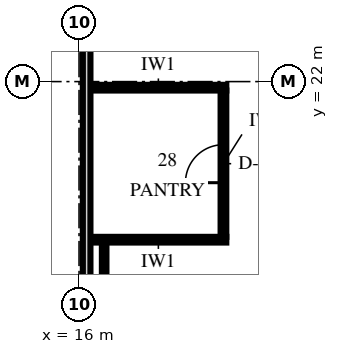
"""IFC4 building model, lengths in metres.
Left out: names, types, materials, properties, quantities, classifications, styles, units other than length and angle.
Written with IfcOpenShell. Run it as: python <this file> out.ifc"""

import sys

from ifc_helpers import new_model, si_unit, direction, frame, frame_2d, origin, place, context, subcontext, project, spatial, rectangle, extrude, element, fill, save


model = new_model("IFC4")
c1 = context("Model", 3, precision=1e-05, world=origin(), true_north=direction((0.0, 1.0)))
c2 = subcontext(c1, "Body", "Model", "MODEL_VIEW")
j1 = project(units=[si_unit("LENGTHUNIT", "METRE"), si_unit("PLANEANGLEUNIT", "RADIAN")], contexts=[c1])
p1 = place(None, origin())
s1 = spatial("IfcSite", under=j1, at=p1, CompositionType="ELEMENT")
p2 = place(p1, origin())
s2 = spatial("IfcBuilding", under=s1, at=p2, CompositionType="ELEMENT")
p3 = place(p2, frame((0.0, 0.0, 103.0)))
s3 = spatial("IfcBuildingStorey", under=s2, at=p3, CompositionType="ELEMENT", Elevation=103.0)
p4 = place(p3, frame((16.3, 17.84, 0.0), z_axis=(0.0, 0.0, 1.0), x_axis=(1.0, 0.0, 0.0)))
e1 = element("IfcWall", 1, at=p4, inside=s3, PredefinedType="PARTITIONING", context=c2, shape_type="SweptSolid", body=[
    extrude(rectangle(XDim=3.575, YDim=0.15, at=frame_2d((1.788, 0.0))), origin(), (0.0, 0.0, 1.0), 3.25),
])
p5 = place(p3, frame((16.3, 21.84, 0.0), z_axis=(0.0, 0.0, 1.0), x_axis=(1.0, 0.0, 0.0)))
e2 = element("IfcWall", 2, at=p5, inside=s3, PredefinedType="PARTITIONING", context=c2, shape_type="SweptSolid", body=[
    extrude(rectangle(XDim=3.575, YDim=0.15, at=frame_2d((1.788, 0.0))), origin(), (0.0, 0.0, 1.0), 3.4),
])
p6 = place(p3, frame((16.2, 3.9, 0.0), z_axis=(0.0, 0.0, 1.0), x_axis=(0.0, 1.0, 0.0)))
e3 = element("IfcWall", 3, at=p6, inside=s3, PredefinedType="PARTITIONING", context=c2, shape_type="SweptSolid", body=[
    extrude(rectangle(XDim=22.2, YDim=0.2, at=frame_2d((11.1, 0.0))), origin(), (0.0, 0.0, 1.0), 2.842),
])
p7 = place(p6, frame((4.5, 0.0, 0.0)))
e4 = element("IfcOpeningElement", 4, at=p7, cuts=e3, PredefinedType="OPENING", context=c2, shape_type="SweptSolid", body=[
    extrude(rectangle(XDim=1.2, YDim=2.4, at=frame_2d((0.6, 1.2))), frame((0.0, 0.115, 0.0), z_axis=(0.0, -1.0, 0.0), x_axis=(1.0, 0.0, 0.0)), (0.0, 0.0, 1.0), 0.23),
])
p8 = place(p3, frame((19.8, 17.915, 0.0), z_axis=(0.0, 0.0, 1.0), x_axis=(0.0, 1.0, 0.0)))
e5 = element("IfcWall", 5, at=p8, inside=s3, PredefinedType="PARTITIONING", context=c2, shape_type="SweptSolid", body=[
    extrude(rectangle(XDim=3.85, YDim=0.15, at=frame_2d((1.925, 0.0))), origin(), (0.0, 0.0, 1.0), 3.25),
])
p9 = place(p8, frame((1.425, 0.0, 0.0)))
e6 = element("IfcOpeningElement", 6, at=p9, cuts=e5, PredefinedType="OPENING", context=c2, shape_type="SweptSolid", body=[
    extrude(rectangle(XDim=1.0, YDim=2.3, at=frame_2d((0.5, 1.15))), frame((0.0, 0.09, 0.0), z_axis=(0.0, -1.0, 0.0), x_axis=(1.0, 0.0, 0.0)), (0.0, 0.0, 1.0), 0.18),
])
p10 = place(p3, frame((16.661, 9.9, 0.0), z_axis=(0.0, 0.0, 1.0), x_axis=(0.0, 1.0, 0.0)))
e7 = element("IfcWall", 7, at=p10, inside=s3, PredefinedType="PARTITIONING", context=c2, shape_type="SweptSolid", body=[
    extrude(rectangle(XDim=7.845, YDim=0.12, at=frame_2d((3.923, 0.0))), origin(), (0.0, 0.0, 1.0), 3.25),
])
p11 = place(p9, origin())
e8 = element("IfcDoor", 8, at=p11, inside=s3, OperationType="SINGLE_SWING_LEFT", PredefinedType="DOOR", context=c2, shape_type="SweptSolid", body=[
    extrude(rectangle(XDim=1.0, YDim=2.3, at=frame_2d((0.5, 1.15))), frame((0.0, 0.075, 0.0), z_axis=(0.0, -1.0, 0.0), x_axis=(1.0, 0.0, 0.0)), (0.0, 0.0, 1.0), 0.149),
])
fill(e6, e8)
save(model, sys.argv[1])
